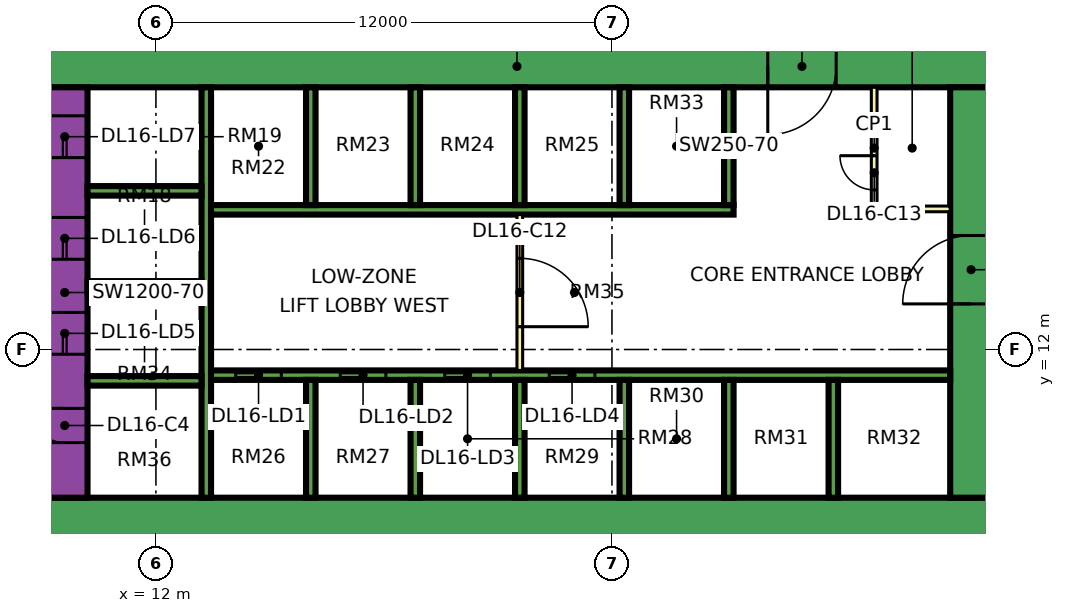
"""IFC4 building model, lengths in metres.
Left out: names, types, materials, properties, quantities, classifications, styles, units other than length and angle.
Written with IfcOpenShell. Run it as: python <this file> out.ifc"""

import sys

from ifc_helpers import new_model, si_unit, direction, frame, frame_2d, origin, place, context, subcontext, project, spatial, rectangle, extrude, element, fill, save


model = new_model("IFC4")
c1 = context("Model", 3, precision=1e-05, world=origin(), true_north=direction((0.0, 1.0)))
c2 = subcontext(c1, "Body", "Model", "MODEL_VIEW")
j1 = project(units=[si_unit("LENGTHUNIT", "METRE"), si_unit("PLANEANGLEUNIT", "RADIAN")], contexts=[c1])
p1 = place(None, origin())
s1 = spatial("IfcSite", under=j1, at=p1, CompositionType="ELEMENT")
p2 = place(p1, origin())
s2 = spatial("IfcBuilding", under=s1, at=p2, CompositionType="ELEMENT")
p3 = place(p2, frame((0.0, 0.0, 75.15)))
s3 = spatial("IfcBuildingStorey", under=s2, at=p3, CompositionType="ELEMENT", Elevation=75.15)
p4 = place(p3, frame((9.0, 7.55, 0.0), z_axis=(0.0, 0.0, 1.0), x_axis=(1.0, 0.0, 0.0)))
e1 = element("IfcWall", 1, at=p4, inside=s3, PredefinedType="SHEAR", context=c2, shape_type="SweptSolid", body=[
    extrude(rectangle(XDim=25.0, YDim=1.1, at=frame_2d((12.5, 0.0))), origin(), (0.0, 0.0, 1.0), 3.75),
])
p5 = place(p3, frame((9.0, 19.45, 0.0), z_axis=(0.0, 0.0, 1.0), x_axis=(1.0, 0.0, 0.0)))
e2 = element("IfcWall", 2, at=p5, inside=s3, PredefinedType="SHEAR", context=c2, shape_type="SweptSolid", body=[
    extrude(rectangle(XDim=25.0, YDim=1.1, at=frame_2d((12.5, 0.0))), origin(), (0.0, 0.0, 1.0), 3.75),
])
p6 = place(p5, frame((19.1, 0.0, 0.0)))
e3 = element("IfcOpeningElement", 3, at=p6, cuts=e2, PredefinedType="OPENING", context=c2, shape_type="SweptSolid", body=[
    extrude(rectangle(XDim=1.8, YDim=2.4, at=frame_2d((0.9, 1.2))), frame((0.0, 0.56, 0.0), z_axis=(0.0, -1.0, 0.0), x_axis=(1.0, 0.0, 0.0)), (0.0, 0.0, 1.0), 1.12),
])
p7 = place(p3, frame((9.6, 8.1, 0.0), z_axis=(0.0, 0.0, 1.0), x_axis=(0.0, 1.0, 0.0)))
e4 = element("IfcWall", 4, at=p7, inside=s3, PredefinedType="SHEAR", context=c2, shape_type="SweptSolid", body=[
    extrude(rectangle(XDim=10.8, YDim=1.2, at=frame_2d((5.4, 0.0))), origin(), (0.0, 0.0, 1.0), 3.75),
])
p8 = place(p7, frame((3.775, 0.0, 0.0)))
e5 = element("IfcOpeningElement", 5, at=p8, cuts=e4, PredefinedType="OPENING", context=c2, shape_type="SweptSolid", body=[
    extrude(rectangle(XDim=1.1, YDim=2.2, at=frame_2d((0.55, 1.1))), frame((0.0, 0.61, 0.0), z_axis=(0.0, -1.0, 0.0), x_axis=(1.0, 0.0, 0.0)), (0.0, 0.0, 1.0), 1.22),
])
p9 = place(p7, frame((6.275, 0.0, 0.0)))
e6 = element("IfcOpeningElement", 6, at=p9, cuts=e4, PredefinedType="OPENING", context=c2, shape_type="SweptSolid", body=[
    extrude(rectangle(XDim=1.1, YDim=2.2, at=frame_2d((0.55, 1.1))), frame((0.0, 0.61, 0.0), z_axis=(0.0, -1.0, 0.0), x_axis=(1.0, 0.0, 0.0)), (0.0, 0.0, 1.0), 1.22),
])
p10 = place(p7, frame((8.95, 0.0, 0.0)))
e7 = element("IfcOpeningElement", 7, at=p10, cuts=e4, PredefinedType="OPENING", context=c2, shape_type="SweptSolid", body=[
    extrude(rectangle(XDim=1.1, YDim=2.2, at=frame_2d((0.55, 1.1))), frame((0.0, 0.61, 0.0), z_axis=(0.0, -1.0, 0.0), x_axis=(1.0, 0.0, 0.0)), (0.0, 0.0, 1.0), 1.22),
])
p11 = place(p7, frame((1.45, 0.0, 0.0)))
e8 = element("IfcOpeningElement", 8, at=p11, cuts=e4, PredefinedType="OPENING", context=c2, shape_type="SweptSolid", body=[
    extrude(rectangle(XDim=0.9, YDim=2.1, at=frame_2d((0.45, 1.05))), frame((0.0, 0.61, 0.0), z_axis=(0.0, -1.0, 0.0), x_axis=(1.0, 0.0, 0.0)), (0.0, 0.0, 1.0), 1.22),
])
p12 = place(p3, frame((33.45, 8.1, 0.0), z_axis=(0.0, 0.0, 1.0), x_axis=(0.0, 1.0, 0.0)))
e9 = element("IfcWall", 9, at=p12, inside=s3, PredefinedType="SHEAR", context=c2, shape_type="SweptSolid", body=[
    extrude(rectangle(XDim=10.8, YDim=1.1, at=frame_2d((5.4, 0.0))), origin(), (0.0, 0.0, 1.0), 3.75),
])
p13 = place(p12, frame((5.1, 0.0, 0.0)))
e10 = element("IfcOpeningElement", 10, at=p13, cuts=e9, PredefinedType="OPENING", context=c2, shape_type="SweptSolid", body=[
    extrude(rectangle(XDim=1.8, YDim=2.4, at=frame_2d((0.9, 1.2))), frame((0.0, 0.56, 0.0), z_axis=(0.0, -1.0, 0.0), x_axis=(1.0, 0.0, 0.0)), (0.0, 0.0, 1.0), 1.12),
])
p14 = place(p3, frame((13.325, 8.1, 0.0), z_axis=(0.0, 0.0, 1.0), x_axis=(0.0, 1.0, 0.0)))
e11 = element("IfcWall", 11, at=p14, inside=s3, PredefinedType="SHEAR", context=c2, shape_type="SweptSolid", body=[
    extrude(rectangle(XDim=10.8, YDim=0.25, at=frame_2d((5.4, 0.0))), origin(), (0.0, 0.0, 1.0), 3.75),
])
p15 = place(p3, frame((13.45, 11.325, 0.0), z_axis=(0.0, 0.0, 1.0), x_axis=(1.0, 0.0, 0.0)))
e12 = element("IfcWall", 12, at=p15, inside=s3, PredefinedType="SHEAR", context=c2, shape_type="SweptSolid", body=[
    extrude(rectangle(XDim=19.45, YDim=0.25, at=frame_2d((9.725, 0.0))), origin(), (0.0, 0.0, 1.0), 3.75),
])
p16 = place(p15, frame((0.65, 0.0, 0.0)))
e13 = element("IfcOpeningElement", 13, at=p16, cuts=e12, PredefinedType="OPENING", context=c2, shape_type="SweptSolid", body=[
    extrude(rectangle(XDim=1.2, YDim=2.2, at=frame_2d((0.6, 1.1))), frame((0.0, 0.135, 0.0), z_axis=(0.0, -1.0, 0.0), x_axis=(1.0, 0.0, 0.0)), (0.0, 0.0, 1.0), 0.27),
])
p17 = place(p15, frame((3.4, 0.0, 0.0)))
e14 = element("IfcOpeningElement", 14, at=p17, cuts=e12, PredefinedType="OPENING", context=c2, shape_type="SweptSolid", body=[
    extrude(rectangle(XDim=1.2, YDim=2.2, at=frame_2d((0.6, 1.1))), frame((0.0, 0.135, 0.0), z_axis=(0.0, -1.0, 0.0), x_axis=(1.0, 0.0, 0.0)), (0.0, 0.0, 1.0), 0.27),
])
p18 = place(p15, frame((6.15, 0.0, 0.0)))
e15 = element("IfcOpeningElement", 15, at=p18, cuts=e12, PredefinedType="OPENING", context=c2, shape_type="SweptSolid", body=[
    extrude(rectangle(XDim=1.2, YDim=2.2, at=frame_2d((0.6, 1.1))), frame((0.0, 0.135, 0.0), z_axis=(0.0, -1.0, 0.0), x_axis=(1.0, 0.0, 0.0)), (0.0, 0.0, 1.0), 0.27),
])
p19 = place(p15, frame((8.9, 0.0, 0.0)))
e16 = element("IfcOpeningElement", 16, at=p19, cuts=e12, PredefinedType="OPENING", context=c2, shape_type="SweptSolid", body=[
    extrude(rectangle(XDim=1.2, YDim=2.2, at=frame_2d((0.6, 1.1))), frame((0.0, 0.135, 0.0), z_axis=(0.0, -1.0, 0.0), x_axis=(1.0, 0.0, 0.0)), (0.0, 0.0, 1.0), 0.27),
])
p20 = place(p3, frame((13.45, 15.675, 0.0), z_axis=(0.0, 0.0, 1.0), x_axis=(1.0, 0.0, 0.0)))
e17 = element("IfcWall", 17, at=p20, inside=s3, PredefinedType="SHEAR", context=c2, shape_type="SweptSolid", body=[
    extrude(rectangle(XDim=13.75, YDim=0.25, at=frame_2d((6.875, 0.0))), origin(), (0.0, 0.0, 1.0), 3.75),
])
for number, where, z_axis, x_axis in (
    (18, (10.2, 11.175, 0.0), (0.0, 0.0, 1.0), (1.0, 0.0, 0.0)),
    (19, (10.2, 13.675, 0.0), (0.0, 0.0, 1.0), (1.0, 0.0, 0.0)),
    (20, (10.2, 16.175, 0.0), (0.0, 0.0, 1.0), (1.0, 0.0, 0.0)),
):
    element("IfcWall", number, at=place(p3, frame(where, z_axis=z_axis, x_axis=x_axis)), inside=s3, PredefinedType="SHEAR", context=c2, shape_type="SweptSolid", body=[
        extrude(rectangle(XDim=3.0, YDim=0.25, at=frame_2d((1.5, 0.0))), origin(), (0.0, 0.0, 1.0), 3.75),
    ])
for number, where, z_axis, x_axis in (
    (21, (16.075, 8.1, 0.0), (0.0, 0.0, 1.0), (0.0, 1.0, 0.0)),
    (22, (18.825, 8.1, 0.0), (0.0, 0.0, 1.0), (0.0, 1.0, 0.0)),
    (23, (21.575, 8.1, 0.0), (0.0, 0.0, 1.0), (0.0, 1.0, 0.0)),
    (24, (24.325, 8.1, 0.0), (0.0, 0.0, 1.0), (0.0, 1.0, 0.0)),
    (25, (27.075, 8.1, 0.0), (0.0, 0.0, 1.0), (0.0, 1.0, 0.0)),
    (26, (29.825, 8.1, 0.0), (0.0, 0.0, 1.0), (0.0, 1.0, 0.0)),
    (27, (16.075, 15.8, 0.0), (0.0, 0.0, 1.0), (0.0, 1.0, 0.0)),
    (28, (18.825, 15.8, 0.0), (0.0, 0.0, 1.0), (0.0, 1.0, 0.0)),
    (29, (21.575, 15.8, 0.0), (0.0, 0.0, 1.0), (0.0, 1.0, 0.0)),
    (30, (24.325, 15.8, 0.0), (0.0, 0.0, 1.0), (0.0, 1.0, 0.0)),
    (31, (27.075, 15.8, 0.0), (0.0, 0.0, 1.0), (0.0, 1.0, 0.0)),
):
    element("IfcWall", number, at=place(p3, frame(where, z_axis=z_axis, x_axis=x_axis)), inside=s3, PredefinedType="SHEAR", context=c2, shape_type="SweptSolid", body=[
        extrude(rectangle(XDim=3.1, YDim=0.25, at=frame_2d((1.55, 0.0))), origin(), (0.0, 0.0, 1.0), 3.75),
    ])
p21 = place(p3, frame((-1.447, 12.553, 0.0), z_axis=(0.0, 0.0, 1.0), x_axis=(0.707106781187, -0.707106781187, 0.0)))
e32 = element("IfcWall", 32, at=p21, inside=s3, PredefinedType="SOLIDWALL", context=c2, shape_type="SweptSolid", body=[
    extrude(rectangle(XDim=19.799, YDim=0.15, at=frame_2d((9.899, 0.0))), origin(), (0.0, 0.0, 1.0), 3.35),
])
p22 = place(p21, frame((2.212, 0.0, 0.45)))
e33 = element("IfcOpeningElement", 33, at=p22, cuts=e32, PredefinedType="OPENING", context=c2, shape_type="SweptSolid", body=[
    extrude(rectangle(XDim=3.0, YDim=2.4, at=frame_2d((1.5, 1.2))), frame((0.0, 0.085, 0.0), z_axis=(0.0, -1.0, 0.0), x_axis=(1.0, 0.0, 0.0)), (0.0, 0.0, 1.0), 0.17),
])
p23 = place(p21, frame((10.216, 0.0, 0.45)))
e34 = element("IfcOpeningElement", 34, at=p23, cuts=e32, PredefinedType="OPENING", context=c2, shape_type="SweptSolid", body=[
    extrude(rectangle(XDim=3.0, YDim=2.4, at=frame_2d((1.5, 1.2))), frame((0.0, 0.085, 0.0), z_axis=(0.0, -1.0, 0.0), x_axis=(1.0, 0.0, 0.0)), (0.0, 0.0, 1.0), 0.17),
])
p24 = place(p3, frame((21.575, 11.45, 0.0), z_axis=(0.0, 0.0, 1.0), x_axis=(0.0, 1.0, 0.0)))
e35 = element("IfcWall", 35, at=p24, inside=s3, PredefinedType="PARTITIONING", context=c2, shape_type="SweptSolid", body=[
    extrude(rectangle(XDim=4.1, YDim=0.15, at=frame_2d((2.05, 0.0))), origin(), (0.0, 0.0, 1.0), 3.35),
])
p25 = place(p24, frame((1.15, 0.0, 0.0)))
e36 = element("IfcOpeningElement", 36, at=p25, cuts=e35, PredefinedType="OPENING", context=c2, shape_type="SweptSolid", body=[
    extrude(rectangle(XDim=1.8, YDim=2.4, at=frame_2d((0.9, 1.2))), frame((0.0, 0.085, 0.0), z_axis=(0.0, -1.0, 0.0), x_axis=(1.0, 0.0, 0.0)), (0.0, 0.0, 1.0), 0.17),
])
p26 = place(p3, frame((30.9, 15.7, 0.0), z_axis=(0.0, 0.0, 1.0), x_axis=(0.0, 1.0, 0.0)))
e37 = element("IfcWall", 37, at=p26, inside=s3, PredefinedType="PARTITIONING", context=c2, shape_type="SweptSolid", body=[
    extrude(rectangle(XDim=3.2, YDim=0.15, at=frame_2d((1.6, 0.0))), origin(), (0.0, 0.0, 1.0), 3.35),
])
p27 = place(p26, frame((0.5, 0.0, 0.0)))
e38 = element("IfcOpeningElement", 38, at=p27, cuts=e37, PredefinedType="OPENING", context=c2, shape_type="SweptSolid", body=[
    extrude(rectangle(XDim=0.9, YDim=2.1, at=frame_2d((0.45, 1.05))), frame((0.0, 0.085, 0.0), z_axis=(0.0, -1.0, 0.0), x_axis=(1.0, 0.0, 0.0)), (0.0, 0.0, 1.0), 0.17),
])
p28 = place(p3, frame((30.9, 15.7, 0.0), z_axis=(0.0, 0.0, 1.0), x_axis=(1.0, 0.0, 0.0)))
e39 = element("IfcWall", 39, at=p28, inside=s3, PredefinedType="PARTITIONING", context=c2, shape_type="SweptSolid", body=[
    extrude(rectangle(XDim=2.0, YDim=0.15, at=frame_2d((1.0, 0.0))), origin(), (0.0, 0.0, 1.0), 3.35),
])
p29 = place(p16, origin())
e40 = element("IfcDoor", 40, at=p29, inside=s3, OperationType="DOUBLE_DOOR_SLIDING", PredefinedType="DOOR", context=c2, shape_type="SweptSolid", body=[
    extrude(rectangle(XDim=1.2, YDim=2.2, at=frame_2d((0.6, 1.1))), frame((0.0, 0.025, 0.0), z_axis=(0.0, -1.0, 0.0), x_axis=(1.0, 0.0, 0.0)), (0.0, 0.0, 1.0), 0.05),
])
fill(e13, e40)
p30 = place(p17, origin())
e41 = element("IfcDoor", 41, at=p30, inside=s3, OperationType="DOUBLE_DOOR_SLIDING", PredefinedType="DOOR", context=c2, shape_type="SweptSolid", body=[
    extrude(rectangle(XDim=1.2, YDim=2.2, at=frame_2d((0.6, 1.1))), frame((0.0, 0.025, 0.0), z_axis=(0.0, -1.0, 0.0), x_axis=(1.0, 0.0, 0.0)), (0.0, 0.0, 1.0), 0.05),
])
fill(e14, e41)
p31 = place(p18, origin())
e42 = element("IfcDoor", 42, at=p31, inside=s3, OperationType="DOUBLE_DOOR_SLIDING", PredefinedType="DOOR", context=c2, shape_type="SweptSolid", body=[
    extrude(rectangle(XDim=1.2, YDim=2.2, at=frame_2d((0.6, 1.1))), frame((0.0, 0.025, 0.0), z_axis=(0.0, -1.0, 0.0), x_axis=(1.0, 0.0, 0.0)), (0.0, 0.0, 1.0), 0.05),
])
fill(e15, e42)
p32 = place(p19, origin())
e43 = element("IfcDoor", 43, at=p32, inside=s3, OperationType="DOUBLE_DOOR_SLIDING", PredefinedType="DOOR", context=c2, shape_type="SweptSolid", body=[
    extrude(rectangle(XDim=1.2, YDim=2.2, at=frame_2d((0.6, 1.1))), frame((0.0, 0.025, 0.0), z_axis=(0.0, -1.0, 0.0), x_axis=(1.0, 0.0, 0.0)), (0.0, 0.0, 1.0), 0.05),
])
fill(e16, e43)
p33 = place(p8, origin())
e44 = element("IfcDoor", 44, at=p33, inside=s3, OperationType="DOUBLE_DOOR_SLIDING", PredefinedType="DOOR", context=c2, shape_type="SweptSolid", body=[
    extrude(rectangle(XDim=1.1, YDim=2.2, at=frame_2d((0.55, 1.1))), frame((0.0, 0.025, 0.0), z_axis=(0.0, -1.0, 0.0), x_axis=(1.0, 0.0, 0.0)), (0.0, 0.0, 1.0), 0.05),
])
fill(e5, e44)
p34 = place(p9, origin())
e45 = element("IfcDoor", 45, at=p34, inside=s3, OperationType="DOUBLE_DOOR_SLIDING", PredefinedType="DOOR", context=c2, shape_type="SweptSolid", body=[
    extrude(rectangle(XDim=1.1, YDim=2.2, at=frame_2d((0.55, 1.1))), frame((0.0, 0.025, 0.0), z_axis=(0.0, -1.0, 0.0), x_axis=(1.0, 0.0, 0.0)), (0.0, 0.0, 1.0), 0.05),
])
fill(e6, e45)
p35 = place(p10, origin())
e46 = element("IfcDoor", 46, at=p35, inside=s3, OperationType="DOUBLE_DOOR_SLIDING", PredefinedType="DOOR", context=c2, shape_type="SweptSolid", body=[
    extrude(rectangle(XDim=1.1, YDim=2.2, at=frame_2d((0.55, 1.1))), frame((0.0, 0.025, 0.0), z_axis=(0.0, -1.0, 0.0), x_axis=(1.0, 0.0, 0.0)), (0.0, 0.0, 1.0), 0.05),
])
fill(e7, e46)
p36 = place(p13, origin())
e47 = element("IfcDoor", 47, at=p36, inside=s3, OperationType="DOUBLE_DOOR_SINGLE_SWING", PredefinedType="DOOR", context=c2, shape_type="SweptSolid", body=[
    extrude(rectangle(XDim=1.8, YDim=2.4, at=frame_2d((0.9, 1.2))), frame((0.0, 0.025, 0.0), z_axis=(0.0, -1.0, 0.0), x_axis=(1.0, 0.0, 0.0)), (0.0, 0.0, 1.0), 0.05),
])
fill(e10, e47)
p37 = place(p6, frame((1.8, 0.0, 0.0), z_axis=(0.0, 0.0, 1.0), x_axis=(-1.0, 0.0, 0.0)))
e48 = element("IfcDoor", 48, at=p37, inside=s3, OperationType="DOUBLE_DOOR_SINGLE_SWING", PredefinedType="DOOR", context=c2, shape_type="SweptSolid", body=[
    extrude(rectangle(XDim=1.8, YDim=2.4, at=frame_2d((0.9, 1.2))), frame((0.0, 0.025, 0.0), z_axis=(0.0, -1.0, 0.0), x_axis=(1.0, 0.0, 0.0)), (0.0, 0.0, 1.0), 0.05),
])
fill(e3, e48)
p38 = place(p11, frame((0.9, 0.0, 0.0), z_axis=(0.0, 0.0, 1.0), x_axis=(-1.0, 0.0, 0.0)))
e49 = element("IfcDoor", 49, at=p38, inside=s3, OperationType="SINGLE_SWING_RIGHT", PredefinedType="DOOR", context=c2, shape_type="SweptSolid", body=[
    extrude(rectangle(XDim=0.9, YDim=2.1, at=frame_2d((0.45, 1.05))), frame((0.0, 0.025, 0.0), z_axis=(0.0, -1.0, 0.0), x_axis=(1.0, 0.0, 0.0)), (0.0, 0.0, 1.0), 0.05),
])
fill(e8, e49)
p39 = place(p25, frame((1.8, 0.0, 0.0), z_axis=(0.0, 0.0, 1.0), x_axis=(-1.0, 0.0, 0.0)))
e50 = element("IfcDoor", 50, at=p39, inside=s3, OperationType="DOUBLE_DOOR_SINGLE_SWING", PredefinedType="DOOR", context=c2, shape_type="SweptSolid", body=[
    extrude(rectangle(XDim=1.8, YDim=2.4, at=frame_2d((0.9, 1.2))), frame((0.0, 0.025, 0.0), z_axis=(0.0, -1.0, 0.0), x_axis=(1.0, 0.0, 0.0)), (0.0, 0.0, 1.0), 0.05),
])
fill(e36, e50)
p40 = place(p27, frame((0.9, 0.0, 0.0), z_axis=(0.0, 0.0, 1.0), x_axis=(-1.0, 0.0, 0.0)))
e51 = element("IfcDoor", 51, at=p40, inside=s3, OperationType="SINGLE_SWING_RIGHT", PredefinedType="DOOR", context=c2, shape_type="SweptSolid", body=[
    extrude(rectangle(XDim=0.9, YDim=2.1, at=frame_2d((0.45, 1.05))), frame((0.0, 0.025, 0.0), z_axis=(0.0, -1.0, 0.0), x_axis=(1.0, 0.0, 0.0)), (0.0, 0.0, 1.0), 0.05),
])
fill(e38, e51)
save(model, sys.argv[1])
